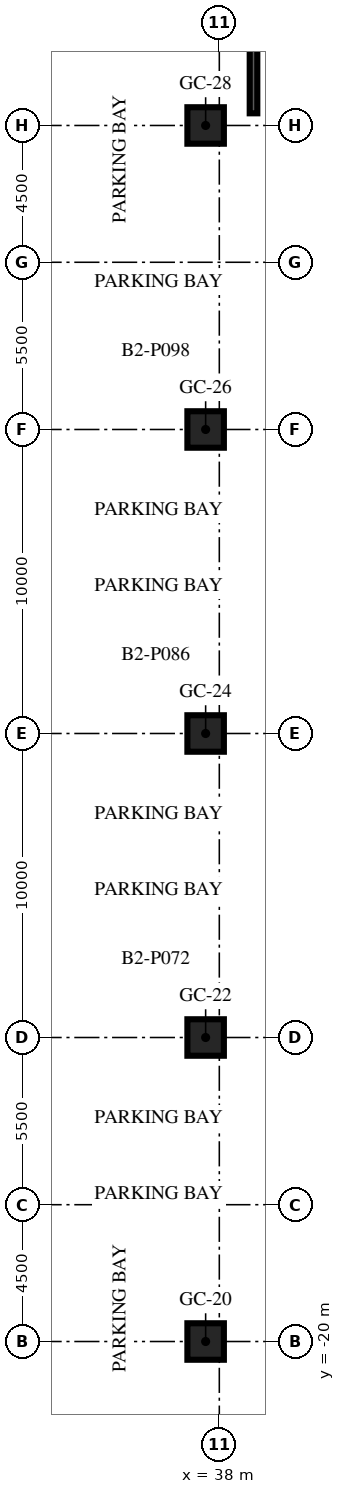
"""IFC4 building model, lengths in metres.
Left out: names, types, materials, properties, quantities, classifications, styles, units other than length and angle.
Written with IfcOpenShell. Run it as: python <this file> out.ifc"""

import sys

from ifc_helpers import new_model, si_unit, direction, frame, origin, origin_2d, place, context, subcontext, project, spatial, polyline, rectangle, outline, extrude, element, save


model = new_model("IFC4")
c1 = context("Model", 3, precision=1e-05, world=origin(), true_north=direction((0.0, 1.0)))
c2 = subcontext(c1, "Body", "Model", "MODEL_VIEW")
j1 = project(units=[si_unit("LENGTHUNIT", "METRE"), si_unit("PLANEANGLEUNIT", "RADIAN")], contexts=[c1])
p1 = place(None, origin())
s1 = spatial("IfcSite", under=j1, at=p1, CompositionType="ELEMENT")
p2 = place(p1, origin())
s2 = spatial("IfcBuilding", under=s1, at=p2, CompositionType="ELEMENT")
p3 = place(p2, frame((0.0, 0.0, -9.0)))
s3 = spatial("IfcBuildingStorey", under=s2, at=p3, CompositionType="ELEMENT", Elevation=-9.0)
for number, where, z_axis, x_axis in (
    (1, (37.55, -20.0, 0.0), (0.0, 0.0, 1.0), (1.0, 0.0, 0.0)),
    (2, (37.55, -10.0, 0.0), (0.0, 0.0, 1.0), (1.0, 0.0, 0.0)),
    (3, (37.55, 0.0, 0.0), (0.0, 0.0, 1.0), (1.0, 0.0, 0.0)),
    (4, (37.55, 10.0, 0.0), (0.0, 0.0, 1.0), (1.0, 0.0, 0.0)),
    (5, (37.55, 20.0, 0.0), (0.0, 0.0, 1.0), (1.0, 0.0, 0.0)),
):
    element("IfcColumn", number, at=place(p3, frame(where, z_axis=z_axis, x_axis=x_axis)), inside=s3, PredefinedType="COLUMN", context=c2, shape_type="SweptSolid", body=[
        extrude(rectangle(XDim=1.2, YDim=1.2, at=origin_2d()), origin(), (0.0, 0.0, 1.0), 3.6),
    ])
p4 = place(p3, frame((39.125, 20.4, 0.0), z_axis=(0.0, 0.0, 1.0), x_axis=(0.0, 1.0, 0.0)))
e6 = element("IfcWall", 6, at=p4, inside=s3, PredefinedType="SOLIDWALL", context=c2, shape_type="SweptSolid", body=[
    extrude(outline(polyline([(0.0, 0.0), (24.6, 0.0), (24.6, 3.6), (7.4, 3.6), (7.4, 3.3), (0.0, 3.3), (0.0, 0.0)])), frame((0.0, 0.125, 0.0), z_axis=(0.0, -1.0, 0.0), x_axis=(1.0, 0.0, 0.0)), (0.0, 0.0, 1.0), 0.25),
])
save(model, sys.argv[1])
